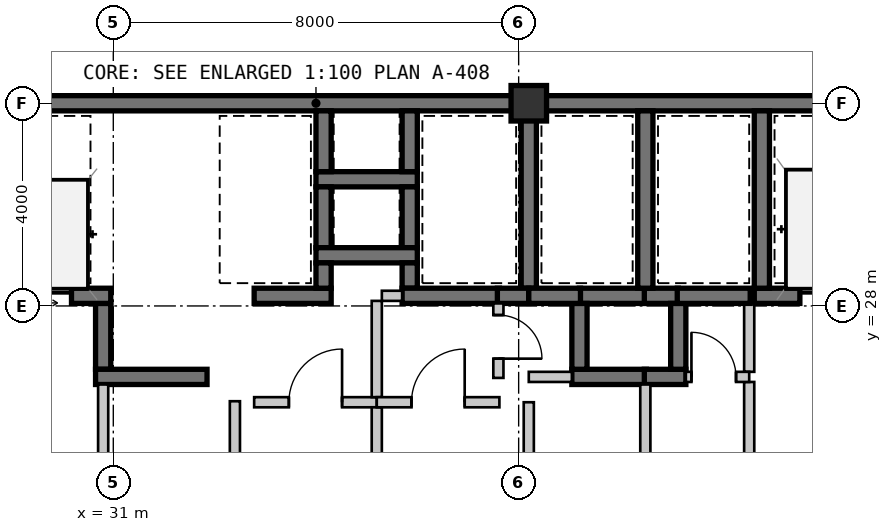
"""IFC4 building model, lengths in metres.
Left out: names, types, materials, properties, quantities, classifications, styles, units other than length and angle.
Written with IfcOpenShell. Run it as: python <this file> out.ifc"""

import sys

from ifc_helpers import new_model, si_unit, direction, frame, frame_2d, origin, origin_2d, place, context, subcontext, project, spatial, rectangle, extrude, source, transform, mapped, element, fill, save


model = new_model("IFC4")
c1 = context("Model", 3, precision=1e-05, world=origin(), true_north=direction((0.0, 1.0)))
c2 = subcontext(c1, "Body", "Model", "MODEL_VIEW")
j1 = project(units=[si_unit("LENGTHUNIT", "METRE"), si_unit("PLANEANGLEUNIT", "RADIAN")], contexts=[c1])
p1 = place(None, origin())
s1 = spatial("IfcSite", under=j1, at=p1, CompositionType="ELEMENT")
p2 = place(p1, origin())
s2 = spatial("IfcBuilding", under=s1, at=p2, CompositionType="ELEMENT")
p3 = place(p2, frame((0.0, 0.0, 99.75)))
s3 = spatial("IfcBuildingStorey", under=s2, at=p3, CompositionType="ELEMENT", Elevation=99.75)
m1 = source(origin(), c2, "Body", "SweptSolid", [
    extrude(rectangle(XDim=0.7, YDim=0.7, at=origin_2d()), origin(), (0.0, 0.0, 1.0), 3.15),
])
p4 = place(p3, frame((39.2, 32.0, 0.0), z_axis=(0.0, 0.0, 1.0), x_axis=(1.0, 0.0, 0.0)))
e1 = element("IfcColumn", 1, at=p4, inside=s3, PredefinedType="COLUMN", context=c2, shape_type="MappedRepresentation", body=[
    mapped(m1, transform((0.0, 0.0, 0.0), scale=1.0)),
])
m2 = source(origin(), c2, "Body", "SweptSolid", [
    extrude(rectangle(XDim=11.2, YDim=0.3, at=frame_2d((5.6, 0.0))), origin(), (0.0, 0.0, 1.0), 2.93),
])
p5 = place(p3, frame((28.0, 32.0, 0.0), z_axis=(0.0, 0.0, 1.0), x_axis=(1.0, 0.0, 0.0)))
e2 = element("IfcWall", 2, at=p5, inside=s3, PredefinedType="SHEAR", context=c2, shape_type="MappedRepresentation", body=[
    mapped(m2, transform((0.0, 0.0, 0.0), scale=1.0)),
])
m3 = source(origin(), c2, "Body", "SweptSolid", [
    extrude(rectangle(XDim=11.95, YDim=0.3, at=frame_2d((5.975, 0.0))), origin(), (0.0, 0.0, 1.0), 2.93),
])
p6 = place(p3, frame((39.2, 32.0, 0.0), z_axis=(0.0, 0.0, 1.0), x_axis=(1.0, 0.0, 0.0)))
e3 = element("IfcWall", 3, at=p6, inside=s3, PredefinedType="SHEAR", context=c2, shape_type="MappedRepresentation", body=[
    mapped(m3, transform((0.0, 0.0, 0.0), scale=1.0)),
])
m4 = source(origin(), c2, "Body", "SweptSolid", [
    extrude(rectangle(XDim=2.9, YDim=0.3, at=frame_2d((1.45, 0.0))), origin(), (0.0, 0.0, 1.0), 2.93),
])
p7 = place(p3, frame((43.65, 28.2, 0.0), z_axis=(0.0, 0.0, 1.0), x_axis=(1.0, 0.0, 0.0)))
e4 = element("IfcWall", 4, at=p7, inside=s3, PredefinedType="SHEAR", context=c2, shape_type="MappedRepresentation", body=[
    mapped(m4, transform((0.0, 0.0, 0.0), scale=1.0)),
])
m5 = source(origin(), c2, "Body", "SweptSolid", [
    extrude(rectangle(XDim=1.1, YDim=2.15, at=frame_2d((0.55, 1.075))), frame((0.0, 0.16, 0.0), z_axis=(0.0, -1.0, 0.0), x_axis=(1.0, 0.0, 0.0)), (0.0, 0.0, 1.0), 0.32),
])
p8 = place(p7, frame((0.9, 0.0, 0.0)))
e5 = element("IfcOpeningElement", 5, at=p8, cuts=e4, PredefinedType="OPENING", context=c2, shape_type="MappedRepresentation", body=[
    mapped(m5, transform((0.0, 0.0, 0.0), scale=1.0)),
])
m6 = source(origin(), c2, "Body", "SweptSolid", [
    extrude(rectangle(XDim=3.5, YDim=0.3, at=frame_2d((1.75, 0.0))), origin(), (0.0, 0.0, 1.0), 2.93),
])
p9 = place(p3, frame((43.8, 31.85, 0.0), z_axis=(0.0, 0.0, 1.0), x_axis=(0.0, -1.0, 0.0)))
e6 = element("IfcWall", 6, at=p9, inside=s3, PredefinedType="SHEAR", context=c2, shape_type="MappedRepresentation", body=[
    mapped(m6, transform((0.0, 0.0, 0.0), scale=1.0)),
])
m7 = source(origin(), c2, "Body", "SweptSolid", [
    extrude(rectangle(XDim=2.4, YDim=0.2, at=frame_2d((1.2, 0.0))), origin(), (0.0, 0.0, 1.0), 2.93),
])
p10 = place(p3, frame((43.55, 26.5, 0.0), z_axis=(0.0, 0.0, 1.0), x_axis=(0.0, -1.0, 0.0)))
e7 = element("IfcWall", 7, at=p10, inside=s3, PredefinedType="SOLIDWALL", context=c2, shape_type="MappedRepresentation", body=[
    mapped(m7, transform((0.0, 0.0, 0.0), scale=1.0)),
])
m8 = source(origin(), c2, "Body", "SweptSolid", [
    extrude(rectangle(XDim=1.35, YDim=0.2, at=frame_2d((0.675, 0.0))), origin(), (0.0, 0.0, 1.0), 2.93),
])
p11 = place(p3, frame((43.55, 28.05, 0.0), z_axis=(0.0, 0.0, 1.0), x_axis=(0.0, -1.0, 0.0)))
e8 = element("IfcWall", 8, at=p11, inside=s3, PredefinedType="SOLIDWALL", context=c2, shape_type="MappedRepresentation", body=[
    mapped(m8, transform((0.0, 0.0, 0.0), scale=1.0)),
])
m9 = source(origin(), c2, "Body", "SweptSolid", [
    extrude(rectangle(XDim=2.0, YDim=0.3, at=frame_2d((1.0, 0.0))), origin(), (0.0, 0.0, 1.0), 2.93),
])
p12 = place(p3, frame((35.0, 30.5, 0.0), z_axis=(0.0, 0.0, 1.0), x_axis=(1.0, 0.0, 0.0)))
e9 = element("IfcWall", 9, at=p12, inside=s3, PredefinedType="SHEAR", context=c2, shape_type="MappedRepresentation", body=[
    mapped(m9, transform((0.0, 0.0, 0.0), scale=1.0)),
])
m10 = source(origin(), c2, "Body", "SweptSolid", [
    extrude(rectangle(XDim=1.2, YDim=0.3, at=frame_2d((0.6, 0.0))), origin(), (0.0, 0.0, 1.0), 2.93),
])
for number, where, z_axis, x_axis in (
    (10, (35.15, 31.85, 0.0), (0.0, 0.0, 1.0), (0.0, -1.0, 0.0)),
    (11, (36.85, 30.65, 0.0), (0.0, 0.0, 1.0), (0.0, 1.0, 0.0)),
    (12, (35.15, 30.35, 0.0), (0.0, 0.0, 1.0), (0.0, -1.0, 0.0)),
    (13, (36.85, 29.15, 0.0), (0.0, 0.0, 1.0), (0.0, 1.0, 0.0)),
):
    element("IfcWall", number, at=place(p3, frame(where, z_axis=z_axis, x_axis=x_axis)), inside=s3, PredefinedType="SHEAR", context=c2, shape_type="MappedRepresentation", body=[
        mapped(m10, transform((0.0, 0.0, 0.0), scale=1.0)),
    ])
p13 = place(p3, frame((35.0, 29.0, 0.0), z_axis=(0.0, 0.0, 1.0), x_axis=(1.0, 0.0, 0.0)))
e14 = element("IfcWall", 14, at=p13, inside=s3, PredefinedType="SHEAR", context=c2, shape_type="MappedRepresentation", body=[
    mapped(m9, transform((0.0, 0.0, 0.0), scale=1.0)),
])
m11 = source(origin(), c2, "Body", "SweptSolid", [
    extrude(rectangle(XDim=1.3, YDim=0.3, at=frame_2d((0.65, 0.0))), origin(), (0.0, 0.0, 1.0), 2.93),
])
p14 = place(p3, frame((30.8, 28.05, 0.0), z_axis=(0.0, 0.0, 1.0), x_axis=(0.0, -1.0, 0.0)))
e15 = element("IfcWall", 15, at=p14, inside=s3, PredefinedType="SHEAR", context=c2, shape_type="MappedRepresentation", body=[
    mapped(m11, transform((0.0, 0.0, 0.0), scale=1.0)),
])
m12 = source(origin(), c2, "Body", "SweptSolid", [
    extrude(rectangle(XDim=2.2, YDim=0.3, at=frame_2d((1.1, 0.0))), origin(), (0.0, 0.0, 1.0), 2.93),
])
p15 = place(p3, frame((30.65, 26.6, 0.0), z_axis=(0.0, 0.0, 1.0), x_axis=(1.0, 0.0, 0.0)))
e16 = element("IfcWall", 16, at=p15, inside=s3, PredefinedType="SHEAR", context=c2, shape_type="MappedRepresentation", body=[
    mapped(m12, transform((0.0, 0.0, 0.0), scale=1.0)),
])
m13 = source(origin(), c2, "Body", "SweptSolid", [
    extrude(rectangle(XDim=1.32, YDim=0.3, at=frame_2d((0.66, 0.0))), origin(), (0.0, 0.0, 1.0), 2.93),
])
p16 = place(p3, frame((41.52, 28.2, 0.0), z_axis=(0.0, 0.0, 1.0), x_axis=(-1.0, 0.0, 0.0)))
e17 = element("IfcWall", 17, at=p16, inside=s3, PredefinedType="SHEAR", context=c2, shape_type="MappedRepresentation", body=[
    mapped(m13, transform((0.0, 0.0, 0.0), scale=1.0)),
])
m14 = source(origin(), c2, "Body", "SweptSolid", [
    extrude(rectangle(XDim=0.67, YDim=0.3, at=frame_2d((0.335, 0.0))), origin(), (0.0, 0.0, 1.0), 2.93),
])
p17 = place(p3, frame((42.15, 28.2, 0.0), z_axis=(0.0, 0.0, 1.0), x_axis=(-1.0, 0.0, 0.0)))
e18 = element("IfcWall", 18, at=p17, inside=s3, PredefinedType="SHEAR", context=c2, shape_type="MappedRepresentation", body=[
    mapped(m14, transform((0.0, 0.0, 0.0), scale=1.0)),
])
m15 = source(origin(), c2, "Body", "SweptSolid", [
    extrude(rectangle(XDim=1.47, YDim=0.3, at=frame_2d((0.735, 0.0))), origin(), (0.0, 0.0, 1.0), 2.93),
])
p18 = place(p3, frame((40.05, 26.6, 0.0), z_axis=(0.0, 0.0, 1.0), x_axis=(1.0, 0.0, 0.0)))
e19 = element("IfcWall", 19, at=p18, inside=s3, PredefinedType="SHEAR", context=c2, shape_type="MappedRepresentation", body=[
    mapped(m15, transform((0.0, 0.0, 0.0), scale=1.0)),
])
p19 = place(p3, frame((40.2, 28.05, 0.0), z_axis=(0.0, 0.0, 1.0), x_axis=(0.0, -1.0, 0.0)))
e20 = element("IfcWall", 20, at=p19, inside=s3, PredefinedType="SHEAR", context=c2, shape_type="MappedRepresentation", body=[
    mapped(m11, transform((0.0, 0.0, 0.0), scale=1.0)),
])
m16 = source(origin(), c2, "Body", "SweptSolid", [
    extrude(rectangle(XDim=0.82, YDim=0.3, at=frame_2d((0.41, 0.0))), origin(), (0.0, 0.0, 1.0), 2.93),
])
p20 = place(p3, frame((41.48, 26.6, 0.0), z_axis=(0.0, 0.0, 1.0), x_axis=(1.0, 0.0, 0.0)))
e21 = element("IfcWall", 21, at=p20, inside=s3, PredefinedType="SHEAR", context=c2, shape_type="MappedRepresentation", body=[
    mapped(m16, transform((0.0, 0.0, 0.0), scale=1.0)),
])
p21 = place(p3, frame((42.15, 26.75, 0.0), z_axis=(0.0, 0.0, 1.0), x_axis=(0.0, 1.0, 0.0)))
e22 = element("IfcWall", 22, at=p21, inside=s3, PredefinedType="SHEAR", context=c2, shape_type="MappedRepresentation", body=[
    mapped(m11, transform((0.0, 0.0, 0.0), scale=1.0)),
])
m17 = source(origin(), c2, "Body", "SweptSolid", [
    extrude(rectangle(XDim=2.45, YDim=0.3, at=frame_2d((1.225, 0.0))), origin(), (0.0, 0.0, 1.0), 2.93),
])
p22 = place(p3, frame((28.5, 28.2, 0.0), z_axis=(0.0, 0.0, 1.0), x_axis=(1.0, 0.0, 0.0)))
e23 = element("IfcWall", 23, at=p22, inside=s3, PredefinedType="SHEAR", context=c2, shape_type="MappedRepresentation", body=[
    mapped(m17, transform((0.0, 0.0, 0.0), scale=1.0)),
])
m18 = source(origin(), c2, "Body", "SweptSolid", [
    extrude(rectangle(XDim=1.05, YDim=2.15, at=frame_2d((0.525, 1.075))), frame((0.0, 0.16, 0.0), z_axis=(0.0, -1.0, 0.0), x_axis=(1.0, 0.0, 0.0)), (0.0, 0.0, 1.0), 0.32),
])
p23 = place(p22, frame((0.625, 0.0, 0.0)))
e24 = element("IfcOpeningElement", 24, at=p23, cuts=e23, PredefinedType="OPENING", context=c2, shape_type="MappedRepresentation", body=[
    mapped(m18, transform((0.0, 0.0, 0.0), scale=1.0)),
])
m19 = source(origin(), c2, "Body", "SweptSolid", [
    extrude(rectangle(XDim=2.35, YDim=0.2, at=frame_2d((1.175, 0.0))), origin(), (0.0, 0.0, 1.0), 2.93),
])
p24 = place(p3, frame((30.8, 26.45, 0.0), z_axis=(0.0, 0.0, 1.0), x_axis=(0.0, -1.0, 0.0)))
e25 = element("IfcWall", 25, at=p24, inside=s3, PredefinedType="SOLIDWALL", context=c2, shape_type="MappedRepresentation", body=[
    mapped(m19, transform((0.0, 0.0, 0.0), scale=1.0)),
])
m20 = source(origin(), c2, "Body", "SweptSolid", [
    extrude(rectangle(XDim=1.52, YDim=0.3, at=frame_2d((0.76, 0.0))), origin(), (0.0, 0.0, 1.0), 2.93),
])
p25 = place(p3, frame((33.78, 28.2, 0.0), z_axis=(0.0, 0.0, 1.0), x_axis=(1.0, 0.0, 0.0)))
e26 = element("IfcWall", 26, at=p25, inside=s3, PredefinedType="SHEAR", context=c2, shape_type="MappedRepresentation", body=[
    mapped(m20, transform((0.0, 0.0, 0.0), scale=1.0)),
])
m21 = source(origin(), c2, "Body", "SweptSolid", [
    extrude(rectangle(XDim=0.5, YDim=0.3, at=frame_2d((0.25, 0.0))), origin(), (0.0, 0.0, 1.0), 2.93),
])
p26 = place(p3, frame((35.15, 28.35, 0.0), z_axis=(0.0, 0.0, 1.0), x_axis=(0.0, 1.0, 0.0)))
e27 = element("IfcWall", 27, at=p26, inside=s3, PredefinedType="SHEAR", context=c2, shape_type="MappedRepresentation", body=[
    mapped(m21, transform((0.0, 0.0, 0.0), scale=1.0)),
])
p27 = place(p3, frame((39.2, 28.35, 0.0), z_axis=(0.0, 0.0, 1.0), x_axis=(0.0, 1.0, 0.0)))
e28 = element("IfcWall", 28, at=p27, inside=s3, PredefinedType="SHEAR", context=c2, shape_type="MappedRepresentation", body=[
    mapped(m6, transform((0.0, 0.0, 0.0), scale=1.0)),
])
p28 = place(p3, frame((36.85, 28.85, 0.0), z_axis=(0.0, 0.0, 1.0), x_axis=(0.0, -1.0, 0.0)))
e29 = element("IfcWall", 29, at=p28, inside=s3, PredefinedType="SHEAR", context=c2, shape_type="MappedRepresentation", body=[
    mapped(m21, transform((0.0, 0.0, 0.0), scale=1.0)),
])
m22 = source(origin(), c2, "Body", "SweptSolid", [
    extrude(rectangle(XDim=1.92, YDim=0.3, at=frame_2d((0.96, 0.0))), origin(), (0.0, 0.0, 1.0), 2.93),
])
p29 = place(p3, frame((36.7, 28.2, 0.0), z_axis=(0.0, 0.0, 1.0), x_axis=(1.0, 0.0, 0.0)))
e30 = element("IfcWall", 30, at=p29, inside=s3, PredefinedType="SHEAR", context=c2, shape_type="MappedRepresentation", body=[
    mapped(m22, transform((0.0, 0.0, 0.0), scale=1.0)),
])
m23 = source(origin(), c2, "Body", "SweptSolid", [
    extrude(rectangle(XDim=0.62, YDim=0.3, at=frame_2d((0.31, 0.0))), origin(), (0.0, 0.0, 1.0), 2.93),
])
p30 = place(p3, frame((38.58, 28.2, 0.0), z_axis=(0.0, 0.0, 1.0), x_axis=(1.0, 0.0, 0.0)))
e31 = element("IfcWall", 31, at=p30, inside=s3, PredefinedType="SHEAR", context=c2, shape_type="MappedRepresentation", body=[
    mapped(m23, transform((0.0, 0.0, 0.0), scale=1.0)),
])
p31 = place(p3, frame((41.5, 28.35, 0.0), z_axis=(0.0, 0.0, 1.0), x_axis=(0.0, 1.0, 0.0)))
e32 = element("IfcWall", 32, at=p31, inside=s3, PredefinedType="SHEAR", context=c2, shape_type="MappedRepresentation", body=[
    mapped(m6, transform((0.0, 0.0, 0.0), scale=1.0)),
])
m24 = source(origin(), c2, "Body", "SweptSolid", [
    extrude(rectangle(XDim=1.02, YDim=0.3, at=frame_2d((0.51, 0.0))), origin(), (0.0, 0.0, 1.0), 2.93),
])
p32 = place(p3, frame((39.2, 28.2, 0.0), z_axis=(0.0, 0.0, 1.0), x_axis=(1.0, 0.0, 0.0)))
e33 = element("IfcWall", 33, at=p32, inside=s3, PredefinedType="SHEAR", context=c2, shape_type="MappedRepresentation", body=[
    mapped(m24, transform((0.0, 0.0, 0.0), scale=1.0)),
])
m25 = source(origin(), c2, "Body", "SweptSolid", [
    extrude(rectangle(XDim=1.44, YDim=0.3, at=frame_2d((0.72, 0.0))), origin(), (0.0, 0.0, 1.0), 2.93),
])
p33 = place(p3, frame((42.13, 28.2, 0.0), z_axis=(0.0, 0.0, 1.0), x_axis=(1.0, 0.0, 0.0)))
e34 = element("IfcWall", 34, at=p33, inside=s3, PredefinedType="SHEAR", context=c2, shape_type="MappedRepresentation", body=[
    mapped(m25, transform((0.0, 0.0, 0.0), scale=1.0)),
])
m26 = source(origin(), c2, "Body", "SweptSolid", [
    extrude(rectangle(XDim=2.02, YDim=0.2, at=frame_2d((1.01, 0.0))), origin(), (0.0, 0.0, 1.0), 2.93),
])
p34 = place(p3, frame((33.4, 26.12, 0.0), z_axis=(0.0, 0.0, 1.0), x_axis=(0.0, -1.0, 0.0)))
e35 = element("IfcWall", 35, at=p34, inside=s3, PredefinedType="SOLIDWALL", context=c2, shape_type="MappedRepresentation", body=[
    mapped(m26, transform((0.0, 0.0, 0.0), scale=1.0)),
])
m27 = source(origin(), c2, "Body", "SweptSolid", [
    extrude(rectangle(XDim=2.42, YDim=0.2, at=frame_2d((1.21, 0.0))), origin(), (0.0, 0.0, 1.0), 2.93),
])
p35 = place(p3, frame((33.78, 26.1, 0.0), z_axis=(0.0, 0.0, 1.0), x_axis=(1.0, 0.0, 0.0)))
e36 = element("IfcWall", 36, at=p35, inside=s3, PredefinedType="SOLIDWALL", context=c2, shape_type="MappedRepresentation", body=[
    mapped(m27, transform((0.0, 0.0, 0.0), scale=1.0)),
])
m28 = source(origin(), c2, "Body", "SweptSolid", [
    extrude(rectangle(XDim=1.05, YDim=2.1, at=frame_2d((0.525, 1.05))), frame((0.0, 0.11, 0.0), z_axis=(0.0, -1.0, 0.0), x_axis=(1.0, 0.0, 0.0)), (0.0, 0.0, 1.0), 0.22),
])
p36 = place(p35, frame((0.685, 0.0, 0.0)))
e37 = element("IfcOpeningElement", 37, at=p36, cuts=e36, PredefinedType="OPENING", context=c2, shape_type="MappedRepresentation", body=[
    mapped(m28, transform((0.0, 0.0, 0.0), scale=1.0)),
])
m29 = source(origin(), c2, "Body", "SweptSolid", [
    extrude(rectangle(XDim=1.9, YDim=0.2, at=frame_2d((0.95, 0.0))), origin(), (0.0, 0.0, 1.0), 2.93),
])
p37 = place(p3, frame((36.2, 26.0, 0.0), z_axis=(0.0, 0.0, 1.0), x_axis=(0.0, -1.0, 0.0)))
e38 = element("IfcWall", 38, at=p37, inside=s3, PredefinedType="SOLIDWALL", context=c2, shape_type="MappedRepresentation", body=[
    mapped(m29, transform((0.0, 0.0, 0.0), scale=1.0)),
])
m30 = source(origin(), c2, "Body", "SweptSolid", [
    extrude(rectangle(XDim=1.9, YDim=0.2, at=frame_2d((0.95, 0.0))), origin(), (0.0, 0.0, 1.0), 2.93),
])
p38 = place(p3, frame((36.2, 28.1, 0.0), z_axis=(0.0, 0.0, 1.0), x_axis=(0.0, -1.0, 0.0)))
e39 = element("IfcWall", 39, at=p38, inside=s3, PredefinedType="SOLIDWALL", context=c2, shape_type="MappedRepresentation", body=[
    mapped(m30, transform((0.0, 0.0, 0.0), scale=1.0)),
])
m31 = source(origin(), c2, "Body", "SweptSolid", [
    extrude(rectangle(XDim=0.4, YDim=0.2, at=frame_2d((0.2, 0.0))), origin(), (0.0, 0.0, 1.0), 2.93),
])
p39 = place(p3, frame((36.7, 28.2, 0.0), z_axis=(0.0, 0.0, 1.0), x_axis=(-1.0, 0.0, 0.0)))
e40 = element("IfcWall", 40, at=p39, inside=s3, PredefinedType="SOLIDWALL", context=c2, shape_type="MappedRepresentation", body=[
    mapped(m31, transform((0.0, 0.0, 0.0), scale=1.0)),
])
m32 = source(origin(), c2, "Body", "SweptSolid", [
    extrude(rectangle(XDim=2.42, YDim=0.2, at=frame_2d((1.21, 0.0))), origin(), (0.0, 0.0, 1.0), 2.93),
])
p40 = place(p3, frame((36.2, 26.1, 0.0), z_axis=(0.0, 0.0, 1.0), x_axis=(1.0, 0.0, 0.0)))
e41 = element("IfcWall", 41, at=p40, inside=s3, PredefinedType="SOLIDWALL", context=c2, shape_type="MappedRepresentation", body=[
    mapped(m32, transform((0.0, 0.0, 0.0), scale=1.0)),
])
p41 = place(p40, frame((0.685, 0.0, 0.0)))
e42 = element("IfcOpeningElement", 42, at=p41, cuts=e41, PredefinedType="OPENING", context=c2, shape_type="MappedRepresentation", body=[
    mapped(m28, transform((0.0, 0.0, 0.0), scale=1.0)),
])
m33 = source(origin(), c2, "Body", "SweptSolid", [
    extrude(rectangle(XDim=2.0, YDim=0.2, at=frame_2d((1.0, 0.0))), origin(), (0.0, 0.0, 1.0), 2.47),
])
p42 = place(p3, frame((39.2, 26.1, 0.0), z_axis=(0.0, 0.0, 1.0), x_axis=(0.0, -1.0, 0.0)))
e43 = element("IfcWall", 43, at=p42, inside=s3, PredefinedType="SOLIDWALL", context=c2, shape_type="MappedRepresentation", body=[
    mapped(m33, transform((0.0, 0.0, 0.0), scale=1.0)),
])
m34 = source(origin(), c2, "Body", "SweptSolid", [
    extrude(rectangle(XDim=1.47, YDim=0.2, at=frame_2d((0.735, 0.0))), origin(), (0.0, 0.0, 1.0), 2.93),
])
p43 = place(p3, frame((38.6, 28.05, 0.0), z_axis=(0.0, 0.0, 1.0), x_axis=(0.0, -1.0, 0.0)))
e44 = element("IfcWall", 44, at=p43, inside=s3, PredefinedType="SOLIDWALL", context=c2, shape_type="MappedRepresentation", body=[
    mapped(m34, transform((0.0, 0.0, 0.0), scale=1.0)),
])
m35 = source(origin(), c2, "Body", "SweptSolid", [
    extrude(rectangle(XDim=0.86, YDim=2.1, at=frame_2d((0.43, 1.05))), frame((0.0, 0.11, 0.0), z_axis=(0.0, -1.0, 0.0), x_axis=(1.0, 0.0, 0.0)), (0.0, 0.0, 1.0), 0.22),
])
p44 = place(p43, frame((0.23, 0.0, 0.0)))
e45 = element("IfcOpeningElement", 45, at=p44, cuts=e44, PredefinedType="OPENING", context=c2, shape_type="MappedRepresentation", body=[
    mapped(m35, transform((0.0, 0.0, 0.0), scale=1.0)),
])
m36 = source(origin(), c2, "Body", "SweptSolid", [
    extrude(rectangle(XDim=0.85, YDim=0.2, at=frame_2d((0.425, 0.0))), origin(), (0.0, 0.0, 1.0), 2.93),
])
p45 = place(p3, frame((39.2, 26.6, 0.0), z_axis=(0.0, 0.0, 1.0), x_axis=(1.0, 0.0, 0.0)))
e46 = element("IfcWall", 46, at=p45, inside=s3, PredefinedType="SOLIDWALL", context=c2, shape_type="MappedRepresentation", body=[
    mapped(m36, transform((0.0, 0.0, 0.0), scale=1.0)),
])
p46 = place(p3, frame((41.5, 26.45, 0.0), z_axis=(0.0, 0.0, 1.0), x_axis=(0.0, -1.0, 0.0)))
e47 = element("IfcWall", 47, at=p46, inside=s3, PredefinedType="SOLIDWALL", context=c2, shape_type="MappedRepresentation", body=[
    mapped(m19, transform((0.0, 0.0, 0.0), scale=1.0)),
])
m37 = source(origin(), c2, "Body", "SweptSolid", [
    extrude(rectangle(XDim=1.25, YDim=0.2, at=frame_2d((0.625, 0.0))), origin(), (0.0, 0.0, 1.0), 2.93),
])
p47 = place(p3, frame((42.3, 26.6, 0.0), z_axis=(0.0, 0.0, 1.0), x_axis=(1.0, 0.0, 0.0)))
e48 = element("IfcWall", 48, at=p47, inside=s3, PredefinedType="SOLIDWALL", context=c2, shape_type="MappedRepresentation", body=[
    mapped(m37, transform((0.0, 0.0, 0.0), scale=1.0)),
])
m38 = source(origin(), c2, "Body", "SweptSolid", [
    extrude(rectangle(XDim=0.88, YDim=2.1, at=frame_2d((0.44, 1.05))), frame((0.0, 0.11, 0.0), z_axis=(0.0, -1.0, 0.0), x_axis=(1.0, 0.0, 0.0)), (0.0, 0.0, 1.0), 0.22),
])
p48 = place(p47, frame((0.11, 0.0, 0.0)))
e49 = element("IfcOpeningElement", 49, at=p48, cuts=e48, PredefinedType="OPENING", context=c2, shape_type="MappedRepresentation", body=[
    mapped(m38, transform((0.0, 0.0, 0.0), scale=1.0)),
])
m39 = source(origin(), c2, "Body", "SweptSolid", [
    extrude(rectangle(XDim=1.1, YDim=2.15, at=frame_2d((0.55, 1.075))), frame((0.0, 0.025, 0.0), z_axis=(0.0, -1.0, 0.0), x_axis=(1.0, 0.0, 0.0)), (0.0, 0.0, 1.0), 0.05),
])
p49 = place(p8, origin())
e50 = element("IfcDoor", 50, at=p49, inside=s3, OperationType="SLIDING_TO_LEFT", PredefinedType="DOOR", context=c2, shape_type="MappedRepresentation", body=[
    mapped(m39, transform((0.0, 0.0, 0.0), scale=1.0)),
])
fill(e5, e50)
m40 = source(origin(), c2, "Body", "SweptSolid", [
    extrude(rectangle(XDim=1.05, YDim=2.15, at=frame_2d((0.525, 1.075))), frame((0.0, 0.025, 0.0), z_axis=(0.0, -1.0, 0.0), x_axis=(1.0, 0.0, 0.0)), (0.0, 0.0, 1.0), 0.05),
])
p50 = place(p23, origin())
e51 = element("IfcDoor", 51, at=p50, inside=s3, OperationType="SLIDING_TO_LEFT", PredefinedType="DOOR", context=c2, shape_type="MappedRepresentation", body=[
    mapped(m40, transform((0.0, 0.0, 0.0), scale=1.0)),
])
fill(e24, e51)
m41 = source(origin(), c2, "Body", "SweptSolid", [
    extrude(rectangle(XDim=1.05, YDim=2.1, at=frame_2d((0.525, 1.05))), frame((0.0, 0.025, 0.0), z_axis=(0.0, -1.0, 0.0), x_axis=(1.0, 0.0, 0.0)), (0.0, 0.0, 1.0), 0.05),
])
p51 = place(p36, origin())
e52 = element("IfcDoor", 52, at=p51, inside=s3, OperationType="SINGLE_SWING_RIGHT", PredefinedType="DOOR", context=c2, shape_type="MappedRepresentation", body=[
    mapped(m41, transform((0.0, 0.0, 0.0), scale=1.0)),
])
fill(e37, e52)
p52 = place(p41, origin())
e53 = element("IfcDoor", 53, at=p52, inside=s3, OperationType="SINGLE_SWING_RIGHT", PredefinedType="DOOR", context=c2, shape_type="MappedRepresentation", body=[
    mapped(m41, transform((0.0, 0.0, 0.0), scale=1.0)),
])
fill(e42, e53)
m42 = source(origin(), c2, "Body", "SweptSolid", [
    extrude(rectangle(XDim=0.88, YDim=2.1, at=frame_2d((0.44, 1.05))), frame((0.0, 0.025, 0.0), z_axis=(0.0, -1.0, 0.0), x_axis=(1.0, 0.0, 0.0)), (0.0, 0.0, 1.0), 0.05),
])
p53 = place(p48, origin())
e54 = element("IfcDoor", 54, at=p53, inside=s3, OperationType="SINGLE_SWING_LEFT", PredefinedType="DOOR", context=c2, shape_type="MappedRepresentation", body=[
    mapped(m42, transform((0.0, 0.0, 0.0), scale=1.0)),
])
fill(e49, e54)
m43 = source(origin(), c2, "Body", "SweptSolid", [
    extrude(rectangle(XDim=0.86, YDim=2.1, at=frame_2d((0.43, 1.05))), frame((0.0, 0.025, 0.0), z_axis=(0.0, -1.0, 0.0), x_axis=(1.0, 0.0, 0.0)), (0.0, 0.0, 1.0), 0.05),
])
p54 = place(p44, origin())
e55 = element("IfcDoor", 55, at=p54, inside=s3, OperationType="SINGLE_SWING_RIGHT", PredefinedType="DOOR", context=c2, shape_type="MappedRepresentation", body=[
    mapped(m43, transform((0.0, 0.0, 0.0), scale=1.0)),
])
fill(e45, e55)
save(model, sys.argv[1])
